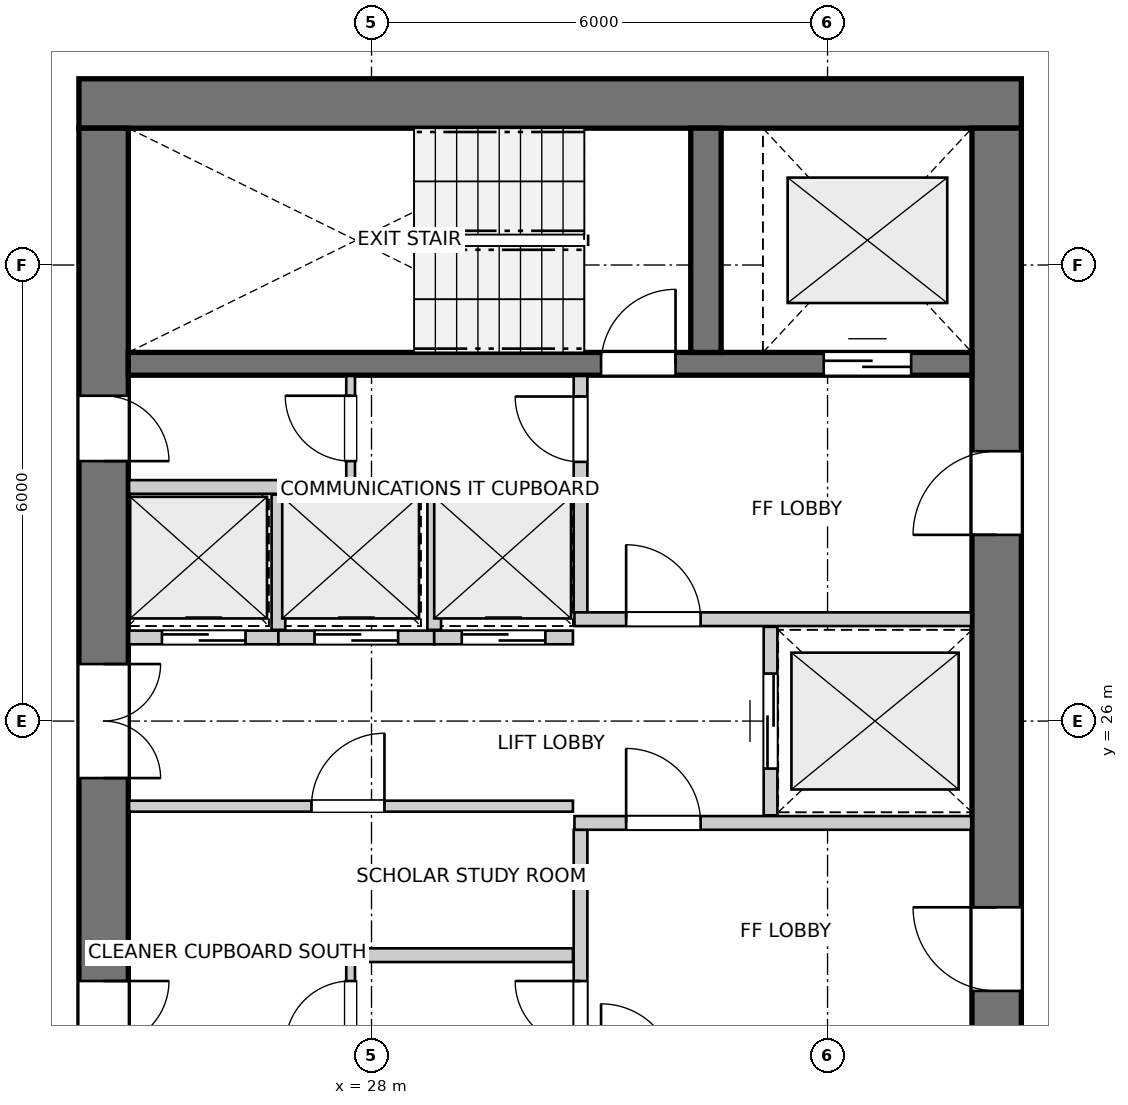
"""IFC4 building model, lengths in metres.
Left out: names, types, materials, properties, quantities, classifications, styles, units other than length and angle.
Written with IfcOpenShell. Run it as: python <this file> out.ifc"""

import sys

from ifc_helpers import new_model, si_unit, direction, frame, frame_2d, origin, place, context, subcontext, project, spatial, rectangle, extrude, source, transform, mapped, element, fill, save


model = new_model("IFC4")
c1 = context("Model", 3, precision=1e-05, world=origin(), true_north=direction((0.0, 1.0)))
c2 = subcontext(c1, "Body", "Model", "MODEL_VIEW")
j1 = project(units=[si_unit("LENGTHUNIT", "METRE"), si_unit("PLANEANGLEUNIT", "RADIAN")], contexts=[c1])
p1 = place(None, origin())
s1 = spatial("IfcSite", under=j1, at=p1, CompositionType="ELEMENT")
p2 = place(p1, origin())
s2 = spatial("IfcBuilding", under=s1, at=p2, CompositionType="ELEMENT")
p3 = place(p2, frame((0.0, 0.0, 171.4)))
s3 = spatial("IfcBuildingStorey", under=s2, at=p3, CompositionType="ELEMENT", Elevation=171.4)
p4 = place(p3, frame((36.55, 34.125, 0.0), z_axis=(0.0, 0.0, 1.0), x_axis=(-1.0, 0.0, 0.0)))
e1 = element("IfcWall", 1, at=p4, inside=s3, PredefinedType="SHEAR", context=c2, shape_type="SweptSolid", body=[
    extrude(rectangle(XDim=12.4, YDim=0.65, at=frame_2d((6.2, 0.0))), origin(), (0.0, 0.0, 1.0), 2.95),
])
p5 = place(p3, frame((24.475, 33.8, 0.0), z_axis=(0.0, 0.0, 1.0), x_axis=(0.0, -1.0, 0.0)))
e2 = element("IfcWall", 2, at=p5, inside=s3, PredefinedType="SHEAR", context=c2, shape_type="SweptSolid", body=[
    extrude(rectangle(XDim=15.6, YDim=0.65, at=frame_2d((7.8, 0.0))), origin(), (0.0, 0.0, 1.0), 2.95),
])
p6 = place(p5, frame((7.05, 0.0, 0.0)))
e3 = element("IfcOpeningElement", 3, at=p6, cuts=e2, PredefinedType="OPENING", context=c2, shape_type="SweptSolid", body=[
    extrude(rectangle(XDim=1.5, YDim=2.15, at=frame_2d((0.75, 1.075))), frame((0.0, 0.335, 0.0), z_axis=(0.0, -1.0, 0.0), x_axis=(1.0, 0.0, 0.0)), (0.0, 0.0, 1.0), 0.67),
])
p7 = place(p5, frame((3.52, 0.0, 0.0)))
e4 = element("IfcOpeningElement", 4, at=p7, cuts=e2, PredefinedType="OPENING", context=c2, shape_type="SweptSolid", body=[
    extrude(rectangle(XDim=0.86, YDim=2.05, at=frame_2d((0.43, 1.025))), frame((0.0, 0.335, 0.0), z_axis=(0.0, -1.0, 0.0), x_axis=(1.0, 0.0, 0.0)), (0.0, 0.0, 1.0), 0.67),
])
p8 = place(p5, frame((11.22, 0.0, 0.0)))
e5 = element("IfcOpeningElement", 5, at=p8, cuts=e2, PredefinedType="OPENING", context=c2, shape_type="SweptSolid", body=[
    extrude(rectangle(XDim=0.86, YDim=2.05, at=frame_2d((0.43, 1.025))), frame((0.0, 0.335, 0.0), z_axis=(0.0, -1.0, 0.0), x_axis=(1.0, 0.0, 0.0)), (0.0, 0.0, 1.0), 0.67),
])
p9 = place(p3, frame((36.225, 18.2, 0.0), z_axis=(0.0, 0.0, 1.0), x_axis=(0.0, 1.0, 0.0)))
e6 = element("IfcWall", 6, at=p9, inside=s3, PredefinedType="SHEAR", context=c2, shape_type="SweptSolid", body=[
    extrude(rectangle(XDim=15.6, YDim=0.65, at=frame_2d((7.8, 0.0))), origin(), (0.0, 0.0, 1.0), 2.95),
])
p10 = place(p9, frame((4.25, 0.0, 0.0)))
e7 = element("IfcOpeningElement", 7, at=p10, cuts=e6, PredefinedType="OPENING", context=c2, shape_type="SweptSolid", body=[
    extrude(rectangle(XDim=1.1, YDim=2.15, at=frame_2d((0.55, 1.075))), frame((0.0, 0.335, 0.0), z_axis=(0.0, -1.0, 0.0), x_axis=(1.0, 0.0, 0.0)), (0.0, 0.0, 1.0), 0.67),
])
p11 = place(p9, frame((10.25, 0.0, 0.0)))
e8 = element("IfcOpeningElement", 8, at=p11, cuts=e6, PredefinedType="OPENING", context=c2, shape_type="SweptSolid", body=[
    extrude(rectangle(XDim=1.1, YDim=2.15, at=frame_2d((0.55, 1.075))), frame((0.0, 0.335, 0.0), z_axis=(0.0, -1.0, 0.0), x_axis=(1.0, 0.0, 0.0)), (0.0, 0.0, 1.0), 0.67),
])
p12 = place(p3, frame((24.8, 30.7, 0.0), z_axis=(0.0, 0.0, 1.0), x_axis=(1.0, 0.0, 0.0)))
e9 = element("IfcWall", 9, at=p12, inside=s3, PredefinedType="SHEAR", context=c2, shape_type="SweptSolid", body=[
    extrude(rectangle(XDim=11.1, YDim=0.3, at=frame_2d((5.55, 0.0))), origin(), (0.0, 0.0, 1.0), 2.95),
])
p13 = place(p12, frame((6.22, 0.0, 0.0)))
e10 = element("IfcOpeningElement", 10, at=p13, cuts=e9, PredefinedType="OPENING", context=c2, shape_type="SweptSolid", body=[
    extrude(rectangle(XDim=0.98, YDim=2.15, at=frame_2d((0.49, 1.075))), frame((0.0, 0.16, 0.0), z_axis=(0.0, -1.0, 0.0), x_axis=(1.0, 0.0, 0.0)), (0.0, 0.0, 1.0), 0.32),
])
p14 = place(p12, frame((9.15, 0.0, 0.0)))
e11 = element("IfcOpeningElement", 11, at=p14, cuts=e9, PredefinedType="OPENING", context=c2, shape_type="SweptSolid", body=[
    extrude(rectangle(XDim=1.15, YDim=2.15, at=frame_2d((0.575, 1.075))), frame((0.0, 0.16, 0.0), z_axis=(0.0, -1.0, 0.0), x_axis=(1.0, 0.0, 0.0)), (0.0, 0.0, 1.0), 0.32),
])
p15 = place(p3, frame((32.4, 30.85, 0.0), z_axis=(0.0, 0.0, 1.0), x_axis=(0.0, 1.0, 0.0)))
e12 = element("IfcWall", 12, at=p15, inside=s3, PredefinedType="SHEAR", context=c2, shape_type="SweptSolid", body=[
    extrude(rectangle(XDim=2.95, YDim=0.4, at=frame_2d((1.475, 0.0))), origin(), (0.0, 0.0, 1.0), 2.95),
])
p16 = place(p3, frame((30.75, 21.46, 0.0), z_axis=(0.0, 0.0, 1.0), x_axis=(0.0, 1.0, 0.0)))
e13 = element("IfcWall", 13, at=p16, inside=s3, PredefinedType="PARTITIONING", context=c2, shape_type="SweptSolid", body=[
    extrude(rectangle(XDim=3.11, YDim=0.18, at=frame_2d((1.555, 0.0))), origin(), (0.0, 0.0, 1.0), 2.95),
])
p17 = place(p16, frame((0.26, 0.0, 0.0)))
e14 = element("IfcOpeningElement", 14, at=p17, cuts=e13, PredefinedType="OPENING", context=c2, shape_type="SweptSolid", body=[
    extrude(rectangle(XDim=0.86, YDim=2.05, at=frame_2d((0.43, 1.025))), frame((0.0, 0.1, 0.0), z_axis=(0.0, -1.0, 0.0), x_axis=(1.0, 0.0, 0.0)), (0.0, 0.0, 1.0), 0.2),
])
p18 = place(p3, frame((30.67, 24.66, 0.0), z_axis=(0.0, 0.0, 1.0), x_axis=(1.0, 0.0, 0.0)))
e15 = element("IfcWall", 15, at=p18, inside=s3, PredefinedType="PARTITIONING", context=c2, shape_type="SweptSolid", body=[
    extrude(rectangle(XDim=5.22, YDim=0.18, at=frame_2d((2.61, 0.0))), origin(), (0.0, 0.0, 1.0), 2.95),
])
p19 = place(p18, frame((0.68, 0.0, 0.0)))
e16 = element("IfcOpeningElement", 16, at=p19, cuts=e15, PredefinedType="OPENING", context=c2, shape_type="SweptSolid", body=[
    extrude(rectangle(XDim=0.98, YDim=2.15, at=frame_2d((0.49, 1.075))), frame((0.0, 0.1, 0.0), z_axis=(0.0, -1.0, 0.0), x_axis=(1.0, 0.0, 0.0)), (0.0, 0.0, 1.0), 0.2),
])
p20 = place(p3, frame((30.75, 27.43, 0.0), z_axis=(0.0, 0.0, 1.0), x_axis=(0.0, 1.0, 0.0)))
e17 = element("IfcWall", 17, at=p20, inside=s3, PredefinedType="PARTITIONING", context=c2, shape_type="SweptSolid", body=[
    extrude(rectangle(XDim=3.11, YDim=0.18, at=frame_2d((1.555, 0.0))), origin(), (0.0, 0.0, 1.0), 2.95),
])
p21 = place(p20, frame((1.98, 0.0, 0.0)))
e18 = element("IfcOpeningElement", 18, at=p21, cuts=e17, PredefinedType="OPENING", context=c2, shape_type="SweptSolid", body=[
    extrude(rectangle(XDim=0.86, YDim=2.05, at=frame_2d((0.43, 1.025))), frame((0.0, 0.1, 0.0), z_axis=(0.0, -1.0, 0.0), x_axis=(1.0, 0.0, 0.0)), (0.0, 0.0, 1.0), 0.2),
])
p22 = place(p3, frame((30.67, 27.34, 0.0), z_axis=(0.0, 0.0, 1.0), x_axis=(1.0, 0.0, 0.0)))
e19 = element("IfcWall", 19, at=p22, inside=s3, PredefinedType="PARTITIONING", context=c2, shape_type="SweptSolid", body=[
    extrude(rectangle(XDim=5.22, YDim=0.18, at=frame_2d((2.61, 0.0))), origin(), (0.0, 0.0, 1.0), 2.95),
])
p23 = place(p22, frame((0.68, 0.0, 0.0)))
e20 = element("IfcOpeningElement", 20, at=p23, cuts=e19, PredefinedType="OPENING", context=c2, shape_type="SweptSolid", body=[
    extrude(rectangle(XDim=0.98, YDim=2.15, at=frame_2d((0.49, 1.075))), frame((0.0, 0.1, 0.0), z_axis=(0.0, -1.0, 0.0), x_axis=(1.0, 0.0, 0.0)), (0.0, 0.0, 1.0), 0.2),
])
p24 = place(p3, frame((33.25, 24.76, 0.0), z_axis=(0.0, 0.0, 1.0), x_axis=(0.0, 1.0, 0.0)))
e21 = element("IfcWall", 21, at=p24, inside=s3, PredefinedType="PARTITIONING", context=c2, shape_type="SweptSolid", body=[
    extrude(rectangle(XDim=2.48, YDim=0.18, at=frame_2d((1.24, 0.0))), origin(), (0.0, 0.0, 1.0), 2.95),
])
p25 = place(p24, frame((0.615, 0.0, 0.0)))
e22 = element("IfcOpeningElement", 22, at=p25, cuts=e21, PredefinedType="OPENING", context=c2, shape_type="SweptSolid", body=[
    extrude(rectangle(XDim=1.25, YDim=2.15, at=frame_2d((0.625, 1.075))), frame((0.0, 0.1, 0.0), z_axis=(0.0, -1.0, 0.0), x_axis=(1.0, 0.0, 0.0)), (0.0, 0.0, 1.0), 0.2),
])
p26 = place(p3, frame((24.81, 22.92, 0.0), z_axis=(0.0, 0.0, 1.0), x_axis=(1.0, 0.0, 0.0)))
e23 = element("IfcWall", 23, at=p26, inside=s3, PredefinedType="PARTITIONING", context=c2, shape_type="SweptSolid", body=[
    extrude(rectangle(XDim=5.84, YDim=0.18, at=frame_2d((2.92, 0.0))), origin(), (0.0, 0.0, 1.0), 2.95),
])
p27 = place(p3, frame((24.81, 24.88, 0.0), z_axis=(0.0, 0.0, 1.0), x_axis=(1.0, 0.0, 0.0)))
e24 = element("IfcWall", 24, at=p27, inside=s3, PredefinedType="PARTITIONING", context=c2, shape_type="SweptSolid", body=[
    extrude(rectangle(XDim=5.84, YDim=0.145, at=frame_2d((2.92, 0.0))), origin(), (0.0, 0.0, 1.0), 2.95),
])
p28 = place(p27, frame((2.4, 0.0, 0.0)))
e25 = element("IfcOpeningElement", 25, at=p28, cuts=e24, PredefinedType="OPENING", context=c2, shape_type="SweptSolid", body=[
    extrude(rectangle(XDim=0.96, YDim=2.1, at=frame_2d((0.48, 1.05))), frame((0.0, 0.083, 0.0), z_axis=(0.0, -1.0, 0.0), x_axis=(1.0, 0.0, 0.0)), (0.0, 0.0, 1.0), 0.165),
])
p29 = place(p3, frame((24.81, 29.08, 0.0), z_axis=(0.0, 0.0, 1.0), x_axis=(1.0, 0.0, 0.0)))
e26 = element("IfcWall", 26, at=p29, inside=s3, PredefinedType="PARTITIONING", context=c2, shape_type="SweptSolid", body=[
    extrude(rectangle(XDim=5.84, YDim=0.18, at=frame_2d((2.92, 0.0))), origin(), (0.0, 0.0, 1.0), 2.95),
])
p30 = place(p3, frame((24.81, 27.1, 0.0), z_axis=(0.0, 0.0, 1.0), x_axis=(1.0, 0.0, 0.0)))
e27 = element("IfcWall", 27, at=p30, inside=s3, PredefinedType="PARTITIONING", context=c2, shape_type="SweptSolid", body=[
    extrude(rectangle(XDim=1.965, YDim=0.18, at=frame_2d((0.982, 0.0))), origin(), (0.0, 0.0, 1.0), 2.95),
])
p31 = place(p30, frame((0.433, 0.0, 0.0)))
e28 = element("IfcOpeningElement", 28, at=p31, cuts=e27, PredefinedType="OPENING", context=c2, shape_type="SweptSolid", body=[
    extrude(rectangle(XDim=1.1, YDim=2.15, at=frame_2d((0.55, 1.075))), frame((0.0, 0.1, 0.0), z_axis=(0.0, -1.0, 0.0), x_axis=(1.0, 0.0, 0.0)), (0.0, 0.0, 1.0), 0.2),
])
p32 = place(p3, frame((26.775, 27.1, 0.0), z_axis=(0.0, 0.0, 1.0), x_axis=(1.0, 0.0, 0.0)))
e29 = element("IfcWall", 29, at=p32, inside=s3, PredefinedType="PARTITIONING", context=c2, shape_type="SweptSolid", body=[
    extrude(rectangle(XDim=2.05, YDim=0.18, at=frame_2d((1.025, 0.0))), origin(), (0.0, 0.0, 1.0), 2.95),
])
p33 = place(p32, frame((0.475, 0.0, 0.0)))
e30 = element("IfcOpeningElement", 30, at=p33, cuts=e29, PredefinedType="OPENING", context=c2, shape_type="SweptSolid", body=[
    extrude(rectangle(XDim=1.1, YDim=2.15, at=frame_2d((0.55, 1.075))), frame((0.0, 0.1, 0.0), z_axis=(0.0, -1.0, 0.0), x_axis=(1.0, 0.0, 0.0)), (0.0, 0.0, 1.0), 0.2),
])
p34 = place(p3, frame((26.775, 27.2, 0.0), z_axis=(0.0, 0.0, 1.0), x_axis=(0.0, 1.0, 0.0)))
e31 = element("IfcWall", 31, at=p34, inside=s3, PredefinedType="PARTITIONING", context=c2, shape_type="SweptSolid", body=[
    extrude(rectangle(XDim=1.78, YDim=0.18, at=frame_2d((0.89, 0.0))), origin(), (0.0, 0.0, 1.0), 2.95),
])
p35 = place(p3, frame((28.825, 27.1, 0.0), z_axis=(0.0, 0.0, 1.0), x_axis=(1.0, 0.0, 0.0)))
e32 = element("IfcWall", 32, at=p35, inside=s3, PredefinedType="PARTITIONING", context=c2, shape_type="SweptSolid", body=[
    extrude(rectangle(XDim=1.825, YDim=0.18, at=frame_2d((0.913, 0.0))), origin(), (0.0, 0.0, 1.0), 2.95),
])
p36 = place(p35, frame((0.363, 0.0, 0.0)))
e33 = element("IfcOpeningElement", 33, at=p36, cuts=e32, PredefinedType="OPENING", context=c2, shape_type="SweptSolid", body=[
    extrude(rectangle(XDim=1.1, YDim=2.15, at=frame_2d((0.55, 1.075))), frame((0.0, 0.1, 0.0), z_axis=(0.0, -1.0, 0.0), x_axis=(1.0, 0.0, 0.0)), (0.0, 0.0, 1.0), 0.2),
])
p37 = place(p3, frame((28.825, 27.2, 0.0), z_axis=(0.0, 0.0, 1.0), x_axis=(0.0, 1.0, 0.0)))
e34 = element("IfcWall", 34, at=p37, inside=s3, PredefinedType="PARTITIONING", context=c2, shape_type="SweptSolid", body=[
    extrude(rectangle(XDim=1.78, YDim=0.18, at=frame_2d((0.89, 0.0))), origin(), (0.0, 0.0, 1.0), 2.95),
])
p38 = place(p3, frame((27.725, 21.46, 0.0), z_axis=(0.0, 0.0, 1.0), x_axis=(0.0, 1.0, 0.0)))
e35 = element("IfcWall", 35, at=p38, inside=s3, PredefinedType="PARTITIONING", context=c2, shape_type="SweptSolid", body=[
    extrude(rectangle(XDim=1.38, YDim=0.115, at=frame_2d((0.69, 0.0))), origin(), (0.0, 0.0, 1.0), 2.95),
])
p39 = place(p38, frame((0.26, 0.0, 0.0)))
e36 = element("IfcOpeningElement", 36, at=p39, cuts=e35, PredefinedType="OPENING", context=c2, shape_type="SweptSolid", body=[
    extrude(rectangle(XDim=0.86, YDim=2.05, at=frame_2d((0.43, 1.025))), frame((0.0, 0.067, 0.0), z_axis=(0.0, -1.0, 0.0), x_axis=(1.0, 0.0, 0.0)), (0.0, 0.0, 1.0), 0.135),
])
p40 = place(p3, frame((27.725, 29.16, 0.0), z_axis=(0.0, 0.0, 1.0), x_axis=(0.0, 1.0, 0.0)))
e37 = element("IfcWall", 37, at=p40, inside=s3, PredefinedType="PARTITIONING", context=c2, shape_type="SweptSolid", body=[
    extrude(rectangle(XDim=1.38, YDim=0.115, at=frame_2d((0.69, 0.0))), origin(), (0.0, 0.0, 1.0), 2.95),
])
p41 = place(p40, frame((0.26, 0.0, 0.0)))
e38 = element("IfcOpeningElement", 38, at=p41, cuts=e37, PredefinedType="OPENING", context=c2, shape_type="SweptSolid", body=[
    extrude(rectangle(XDim=0.86, YDim=2.05, at=frame_2d((0.43, 1.025))), frame((0.0, 0.067, 0.0), z_axis=(0.0, -1.0, 0.0), x_axis=(1.0, 0.0, 0.0)), (0.0, 0.0, 1.0), 0.135),
])
m1 = source(origin(), c2, "Body", "SweptSolid", [
    extrude(rectangle(XDim=0.98, YDim=2.15, at=frame_2d((0.49, 1.075))), frame((0.0, 0.025, 0.0), z_axis=(0.0, -1.0, 0.0), x_axis=(1.0, 0.0, 0.0)), (0.0, 0.0, 1.0), 0.05),
])
p42 = place(p13, origin())
e39 = element("IfcDoor", 39, at=p42, inside=s3, OperationType="SINGLE_SWING_RIGHT", PredefinedType="DOOR", context=c2, shape_type="MappedRepresentation", body=[
    mapped(m1, transform((0.0, 0.0, 0.0), x_axis=(1.0, 0.0, 0.0), y_axis=(0.0, 1.0, 0.0), z_axis=(0.0, 0.0, 1.0), scale=1.0)),
])
fill(e10, e39)
m2 = source(origin(), c2, "Body", "SweptSolid", [
    extrude(rectangle(XDim=1.15, YDim=2.15, at=frame_2d((0.575, 1.075))), frame((0.0, 0.025, 0.0), z_axis=(0.0, -1.0, 0.0), x_axis=(1.0, 0.0, 0.0)), (0.0, 0.0, 1.0), 0.05),
])
p43 = place(p14, origin())
e40 = element("IfcDoor", 40, at=p43, inside=s3, OperationType="DOUBLE_DOOR_SLIDING", PredefinedType="DOOR", context=c2, shape_type="MappedRepresentation", body=[
    mapped(m2, transform((0.0, 0.0, 0.0), x_axis=(1.0, 0.0, 0.0), y_axis=(0.0, 1.0, 0.0), z_axis=(0.0, 0.0, 1.0), scale=1.0)),
])
fill(e11, e40)
m3 = source(origin(), c2, "Body", "SweptSolid", [
    extrude(rectangle(XDim=1.1, YDim=2.15, at=frame_2d((0.55, 1.075))), frame((0.0, 0.025, 0.0), z_axis=(0.0, -1.0, 0.0), x_axis=(1.0, 0.0, 0.0)), (0.0, 0.0, 1.0), 0.05),
])
p44 = place(p10, origin())
e41 = element("IfcDoor", 41, at=p44, inside=s3, OperationType="SINGLE_SWING_RIGHT", PredefinedType="DOOR", context=c2, shape_type="MappedRepresentation", body=[
    mapped(m3, transform((0.0, 0.0, 0.0), x_axis=(1.0, 0.0, 0.0), y_axis=(0.0, 1.0, 0.0), z_axis=(0.0, 0.0, 1.0), scale=1.0)),
])
fill(e7, e41)
p45 = place(p11, origin())
e42 = element("IfcDoor", 42, at=p45, inside=s3, OperationType="SINGLE_SWING_LEFT", PredefinedType="DOOR", context=c2, shape_type="MappedRepresentation", body=[
    mapped(m3, transform((0.0, 0.0, 0.0), x_axis=(1.0, 0.0, 0.0), y_axis=(0.0, 1.0, 0.0), z_axis=(0.0, 0.0, 1.0), scale=1.0)),
])
fill(e8, e42)
m4 = source(origin(), c2, "Body", "SweptSolid", [
    extrude(rectangle(XDim=1.5, YDim=2.15, at=frame_2d((0.75, 1.075))), frame((0.0, 0.025, 0.0), z_axis=(0.0, -1.0, 0.0), x_axis=(1.0, 0.0, 0.0)), (0.0, 0.0, 1.0), 0.05),
])
p46 = place(p6, origin())
e43 = element("IfcDoor", 43, at=p46, inside=s3, OperationType="DOUBLE_DOOR_SINGLE_SWING", PredefinedType="DOOR", context=c2, shape_type="MappedRepresentation", body=[
    mapped(m4, transform((0.0, 0.0, 0.0), x_axis=(1.0, 0.0, 0.0), y_axis=(0.0, 1.0, 0.0), z_axis=(0.0, 0.0, 1.0), scale=1.0)),
])
fill(e3, e43)
m5 = source(origin(), c2, "Body", "SweptSolid", [
    extrude(rectangle(XDim=0.86, YDim=2.05, at=frame_2d((0.43, 1.025))), frame((0.0, 0.025, 0.0), z_axis=(0.0, -1.0, 0.0), x_axis=(1.0, 0.0, 0.0)), (0.0, 0.0, 1.0), 0.05),
])
p47 = place(p7, origin())
e44 = element("IfcDoor", 44, at=p47, inside=s3, OperationType="SINGLE_SWING_RIGHT", PredefinedType="DOOR", context=c2, shape_type="MappedRepresentation", body=[
    mapped(m5, transform((0.0, 0.0, 0.0), x_axis=(1.0, 0.0, 0.0), y_axis=(0.0, 1.0, 0.0), z_axis=(0.0, 0.0, 1.0), scale=1.0)),
])
fill(e4, e44)
p48 = place(p8, origin())
e45 = element("IfcDoor", 45, at=p48, inside=s3, OperationType="SINGLE_SWING_LEFT", PredefinedType="DOOR", context=c2, shape_type="MappedRepresentation", body=[
    mapped(m5, transform((0.0, 0.0, 0.0), x_axis=(1.0, 0.0, 0.0), y_axis=(0.0, 1.0, 0.0), z_axis=(0.0, 0.0, 1.0), scale=1.0)),
])
fill(e5, e45)
p49 = place(p17, origin())
e46 = element("IfcDoor", 46, at=p49, inside=s3, OperationType="SINGLE_SWING_RIGHT", PredefinedType="DOOR", context=c2, shape_type="MappedRepresentation", body=[
    mapped(m5, transform((0.0, 0.0, 0.0), x_axis=(1.0, 0.0, 0.0), y_axis=(0.0, 1.0, 0.0), z_axis=(0.0, 0.0, 1.0), scale=1.0)),
])
fill(e14, e46)
p50 = place(p19, origin())
e47 = element("IfcDoor", 47, at=p50, inside=s3, OperationType="SINGLE_SWING_LEFT", PredefinedType="DOOR", context=c2, shape_type="MappedRepresentation", body=[
    mapped(m1, transform((0.0, 0.0, 0.0), x_axis=(1.0, 0.0, 0.0), y_axis=(0.0, 1.0, 0.0), z_axis=(0.0, 0.0, 1.0), scale=1.0)),
])
fill(e16, e47)
p51 = place(p21, origin())
e48 = element("IfcDoor", 48, at=p51, inside=s3, OperationType="SINGLE_SWING_RIGHT", PredefinedType="DOOR", context=c2, shape_type="MappedRepresentation", body=[
    mapped(m5, transform((0.0, 0.0, 0.0), x_axis=(1.0, 0.0, 0.0), y_axis=(0.0, 1.0, 0.0), z_axis=(0.0, 0.0, 1.0), scale=1.0)),
])
fill(e18, e48)
p52 = place(p23, origin())
e49 = element("IfcDoor", 49, at=p52, inside=s3, OperationType="SINGLE_SWING_LEFT", PredefinedType="DOOR", context=c2, shape_type="MappedRepresentation", body=[
    mapped(m1, transform((0.0, 0.0, 0.0), x_axis=(1.0, 0.0, 0.0), y_axis=(0.0, 1.0, 0.0), z_axis=(0.0, 0.0, 1.0), scale=1.0)),
])
fill(e20, e49)
m6 = source(origin(), c2, "Body", "SweptSolid", [
    extrude(rectangle(XDim=1.25, YDim=2.15, at=frame_2d((0.625, 1.075))), frame((0.0, 0.025, 0.0), z_axis=(0.0, -1.0, 0.0), x_axis=(1.0, 0.0, 0.0)), (0.0, 0.0, 1.0), 0.05),
])
p53 = place(p25, origin())
e50 = element("IfcDoor", 50, at=p53, inside=s3, OperationType="DOUBLE_DOOR_SLIDING", PredefinedType="DOOR", context=c2, shape_type="MappedRepresentation", body=[
    mapped(m6, transform((0.0, 0.0, 0.0), x_axis=(1.0, 0.0, 0.0), y_axis=(0.0, 1.0, 0.0), z_axis=(0.0, 0.0, 1.0), scale=1.0)),
])
fill(e22, e50)
m7 = source(origin(), c2, "Body", "SweptSolid", [
    extrude(rectangle(XDim=0.96, YDim=2.1, at=frame_2d((0.48, 1.05))), frame((0.0, 0.025, 0.0), z_axis=(0.0, -1.0, 0.0), x_axis=(1.0, 0.0, 0.0)), (0.0, 0.0, 1.0), 0.05),
])
p54 = place(p28, origin())
e51 = element("IfcDoor", 51, at=p54, inside=s3, OperationType="SINGLE_SWING_RIGHT", PredefinedType="DOOR", context=c2, shape_type="MappedRepresentation", body=[
    mapped(m7, transform((0.0, 0.0, 0.0), x_axis=(1.0, 0.0, 0.0), y_axis=(0.0, 1.0, 0.0), z_axis=(0.0, 0.0, 1.0), scale=1.0)),
])
fill(e25, e51)
p55 = place(p31, origin())
e52 = element("IfcDoor", 52, at=p55, inside=s3, OperationType="DOUBLE_DOOR_SLIDING", PredefinedType="DOOR", context=c2, shape_type="MappedRepresentation", body=[
    mapped(m3, transform((0.0, 0.0, 0.0), x_axis=(1.0, 0.0, 0.0), y_axis=(0.0, 1.0, 0.0), z_axis=(0.0, 0.0, 1.0), scale=1.0)),
])
fill(e28, e52)
p56 = place(p33, origin())
e53 = element("IfcDoor", 53, at=p56, inside=s3, OperationType="DOUBLE_DOOR_SLIDING", PredefinedType="DOOR", context=c2, shape_type="MappedRepresentation", body=[
    mapped(m3, transform((0.0, 0.0, 0.0), x_axis=(1.0, 0.0, 0.0), y_axis=(0.0, 1.0, 0.0), z_axis=(0.0, 0.0, 1.0), scale=1.0)),
])
fill(e30, e53)
p57 = place(p36, origin())
e54 = element("IfcDoor", 54, at=p57, inside=s3, OperationType="DOUBLE_DOOR_SLIDING", PredefinedType="DOOR", context=c2, shape_type="MappedRepresentation", body=[
    mapped(m3, transform((0.0, 0.0, 0.0), x_axis=(1.0, 0.0, 0.0), y_axis=(0.0, 1.0, 0.0), z_axis=(0.0, 0.0, 1.0), scale=1.0)),
])
fill(e33, e54)
p58 = place(p39, origin())
e55 = element("IfcDoor", 55, at=p58, inside=s3, OperationType="SINGLE_SWING_LEFT", PredefinedType="DOOR", context=c2, shape_type="MappedRepresentation", body=[
    mapped(m5, transform((0.0, 0.0, 0.0), x_axis=(1.0, 0.0, 0.0), y_axis=(0.0, 1.0, 0.0), z_axis=(0.0, 0.0, 1.0), scale=1.0)),
])
fill(e36, e55)
p59 = place(p41, origin())
e56 = element("IfcDoor", 56, at=p59, inside=s3, OperationType="SINGLE_SWING_RIGHT", PredefinedType="DOOR", context=c2, shape_type="MappedRepresentation", body=[
    mapped(m5, transform((0.0, 0.0, 0.0), x_axis=(1.0, 0.0, 0.0), y_axis=(0.0, 1.0, 0.0), z_axis=(0.0, 0.0, 1.0), scale=1.0)),
])
fill(e38, e56)
save(model, sys.argv[1])
